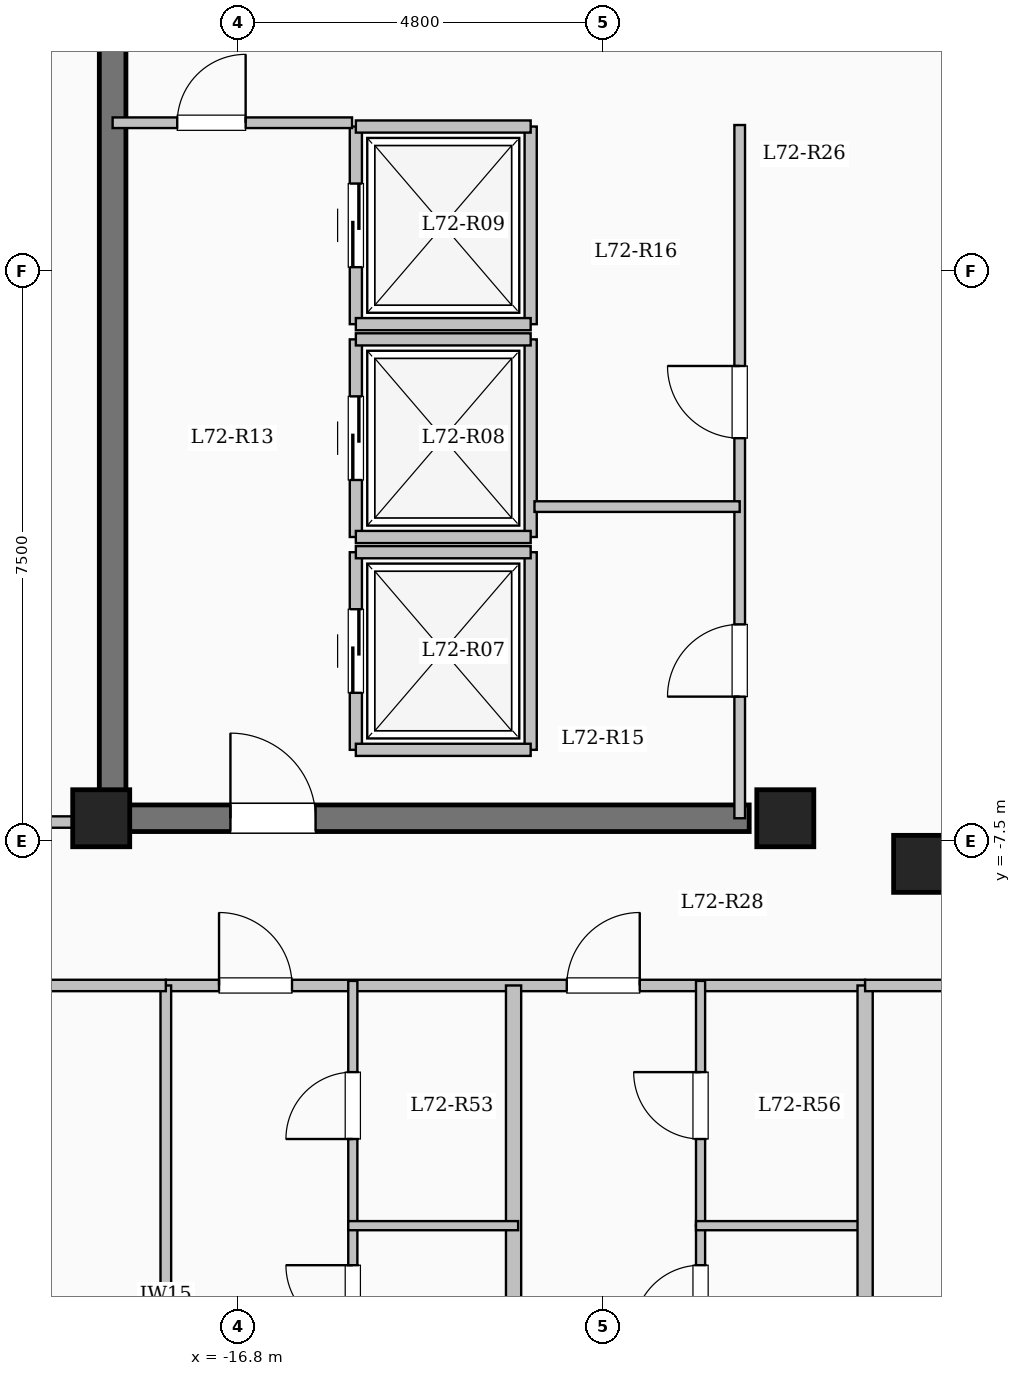
"""IFC4 building model, lengths in metres.
Left out: names, types, materials, properties, quantities, classifications, styles, units other than length and angle.
Written with IfcOpenShell. Run it as: python <this file> out.ifc"""

import sys

from ifc_helpers import new_model, si_unit, direction, frame, frame_2d, origin, origin_2d, place, context, subcontext, project, spatial, rectangle, extrude, element, fill, save


model = new_model("IFC4")
c1 = context("Model", 3, precision=1e-05, world=origin(), true_north=direction((0.0, 1.0)))
c2 = subcontext(c1, "Body", "Model", "MODEL_VIEW")
j1 = project(units=[si_unit("LENGTHUNIT", "METRE"), si_unit("PLANEANGLEUNIT", "RADIAN")], contexts=[c1])
p1 = place(None, origin())
s1 = spatial("IfcSite", under=j1, at=p1, CompositionType="ELEMENT")
p2 = place(p1, origin())
s2 = spatial("IfcBuilding", under=s1, at=p2, CompositionType="ELEMENT")
p3 = place(p2, frame((0.0, 0.0, 264.95)))
s3 = spatial("IfcBuildingStorey", under=s2, at=p3, CompositionType="ELEMENT", Elevation=264.95)
for number, where, z_axis, x_axis in (
    (1, (-7.8, -7.8, 0.0), (0.0, 0.0, 1.0), (1.0, 0.0, 0.0)),
    (2, (-9.6, -7.2, 0.0), (0.0, 0.0, 1.0), (1.0, 0.0, 0.0)),
    (3, (-18.6, -7.2, 0.0), (0.0, 0.0, 1.0), (1.0, 0.0, 0.0)),
):
    element("IfcColumn", number, at=place(p3, frame(where, z_axis=z_axis, x_axis=x_axis)), inside=s3, PredefinedType="COLUMN", context=c2, shape_type="SweptSolid", body=[
        extrude(rectangle(XDim=0.75, YDim=0.75, at=origin_2d()), origin(), (0.0, 0.0, 1.0), 3.35),
    ])
p4 = place(p3, frame((-15.25, -6.3, 0.0), z_axis=(0.0, 0.0, 1.0), x_axis=(0.0, 1.0, 0.0)))
e4 = element("IfcWall", 4, at=p4, inside=s3, PredefinedType="SOLIDWALL", context=c2, shape_type="SweptSolid", body=[
    extrude(rectangle(XDim=2.6, YDim=0.16, at=frame_2d((1.3, 0.0))), origin(), (0.0, 0.0, 1.0), 3.1),
])
p5 = place(p4, frame((0.75, 0.0, 0.0)))
e5 = element("IfcOpeningElement", 5, at=p5, cuts=e4, PredefinedType="OPENING", context=c2, shape_type="SweptSolid", body=[
    extrude(rectangle(XDim=1.1, YDim=2.15, at=frame_2d((0.55, 1.075))), frame((0.0, 0.09, 0.0), z_axis=(0.0, -1.0, 0.0), x_axis=(1.0, 0.0, 0.0)), (0.0, 0.0, 1.0), 0.18),
])
p6 = place(p3, frame((-12.95, -6.3, 0.0), z_axis=(0.0, 0.0, 1.0), x_axis=(0.0, 1.0, 0.0)))
e6 = element("IfcWall", 6, at=p6, inside=s3, PredefinedType="SOLIDWALL", context=c2, shape_type="SweptSolid", body=[
    extrude(rectangle(XDim=2.6, YDim=0.16, at=frame_2d((1.3, 0.0))), origin(), (0.0, 0.0, 1.0), 3.1),
])
for number, where, z_axis, x_axis in (
    (7, (-15.25, -6.3, 0.0), (0.0, 0.0, 1.0), (1.0, 0.0, 0.0)),
    (8, (-15.25, -3.7, 0.0), (0.0, 0.0, 1.0), (1.0, 0.0, 0.0)),
):
    element("IfcWall", number, at=place(p3, frame(where, z_axis=z_axis, x_axis=x_axis)), inside=s3, PredefinedType="SOLIDWALL", context=c2, shape_type="SweptSolid", body=[
        extrude(rectangle(XDim=2.3, YDim=0.16, at=frame_2d((1.15, 0.0))), origin(), (0.0, 0.0, 1.0), 3.1),
    ])
p7 = place(p3, frame((-15.25, -3.5, 0.0), z_axis=(0.0, 0.0, 1.0), x_axis=(0.0, 1.0, 0.0)))
e9 = element("IfcWall", 9, at=p7, inside=s3, PredefinedType="SOLIDWALL", context=c2, shape_type="SweptSolid", body=[
    extrude(rectangle(XDim=2.6, YDim=0.16, at=frame_2d((1.3, 0.0))), origin(), (0.0, 0.0, 1.0), 3.1),
])
p8 = place(p7, frame((0.75, 0.0, 0.0)))
e10 = element("IfcOpeningElement", 10, at=p8, cuts=e9, PredefinedType="OPENING", context=c2, shape_type="SweptSolid", body=[
    extrude(rectangle(XDim=1.1, YDim=2.15, at=frame_2d((0.55, 1.075))), frame((0.0, 0.09, 0.0), z_axis=(0.0, -1.0, 0.0), x_axis=(1.0, 0.0, 0.0)), (0.0, 0.0, 1.0), 0.18),
])
p9 = place(p3, frame((-12.95, -3.5, 0.0), z_axis=(0.0, 0.0, 1.0), x_axis=(0.0, 1.0, 0.0)))
e11 = element("IfcWall", 11, at=p9, inside=s3, PredefinedType="SOLIDWALL", context=c2, shape_type="SweptSolid", body=[
    extrude(rectangle(XDim=2.6, YDim=0.16, at=frame_2d((1.3, 0.0))), origin(), (0.0, 0.0, 1.0), 3.1),
])
for number, where, z_axis, x_axis in (
    (12, (-15.25, -3.5, 0.0), (0.0, 0.0, 1.0), (1.0, 0.0, 0.0)),
    (13, (-15.25, -0.9, 0.0), (0.0, 0.0, 1.0), (1.0, 0.0, 0.0)),
):
    element("IfcWall", number, at=place(p3, frame(where, z_axis=z_axis, x_axis=x_axis)), inside=s3, PredefinedType="SOLIDWALL", context=c2, shape_type="SweptSolid", body=[
        extrude(rectangle(XDim=2.3, YDim=0.16, at=frame_2d((1.15, 0.0))), origin(), (0.0, 0.0, 1.0), 3.1),
    ])
p10 = place(p3, frame((-15.25, -0.7, 0.0), z_axis=(0.0, 0.0, 1.0), x_axis=(0.0, 1.0, 0.0)))
e14 = element("IfcWall", 14, at=p10, inside=s3, PredefinedType="SOLIDWALL", context=c2, shape_type="SweptSolid", body=[
    extrude(rectangle(XDim=2.6, YDim=0.16, at=frame_2d((1.3, 0.0))), origin(), (0.0, 0.0, 1.0), 3.1),
])
p11 = place(p10, frame((0.75, 0.0, 0.0)))
e15 = element("IfcOpeningElement", 15, at=p11, cuts=e14, PredefinedType="OPENING", context=c2, shape_type="SweptSolid", body=[
    extrude(rectangle(XDim=1.1, YDim=2.15, at=frame_2d((0.55, 1.075))), frame((0.0, 0.09, 0.0), z_axis=(0.0, -1.0, 0.0), x_axis=(1.0, 0.0, 0.0)), (0.0, 0.0, 1.0), 0.18),
])
p12 = place(p3, frame((-12.95, -0.7, 0.0), z_axis=(0.0, 0.0, 1.0), x_axis=(0.0, 1.0, 0.0)))
e16 = element("IfcWall", 16, at=p12, inside=s3, PredefinedType="SOLIDWALL", context=c2, shape_type="SweptSolid", body=[
    extrude(rectangle(XDim=2.6, YDim=0.16, at=frame_2d((1.3, 0.0))), origin(), (0.0, 0.0, 1.0), 3.1),
])
for number, where, z_axis, x_axis in (
    (17, (-15.25, -0.7, 0.0), (0.0, 0.0, 1.0), (1.0, 0.0, 0.0)),
    (18, (-15.25, 1.9, 0.0), (0.0, 0.0, 1.0), (1.0, 0.0, 0.0)),
):
    element("IfcWall", number, at=place(p3, frame(where, z_axis=z_axis, x_axis=x_axis)), inside=s3, PredefinedType="SOLIDWALL", context=c2, shape_type="SweptSolid", body=[
        extrude(rectangle(XDim=2.3, YDim=0.16, at=frame_2d((1.15, 0.0))), origin(), (0.0, 0.0, 1.0), 3.1),
    ])
p13 = place(p3, frame((-18.45, -7.375, 0.0), z_axis=(0.0, 0.0, 1.0), x_axis=(0.0, 1.0, 0.0)))
e19 = element("IfcWall", 19, at=p13, inside=s3, PredefinedType="SHEAR", context=c2, shape_type="SweptSolid", body=[
    extrude(rectangle(XDim=14.05, YDim=0.35, at=frame_2d((7.025, 0.0))), origin(), (0.0, 0.0, 1.0), 3.35),
])
p14 = place(p3, frame((-18.625, -7.2, 0.0), z_axis=(0.0, 0.0, 1.0), x_axis=(1.0, 0.0, 0.0)))
e20 = element("IfcWall", 20, at=p14, inside=s3, PredefinedType="SHEAR", context=c2, shape_type="SweptSolid", body=[
    extrude(rectangle(XDim=8.55, YDim=0.35, at=frame_2d((4.275, 0.0))), origin(), (0.0, 0.0, 1.0), 3.35),
])
p15 = place(p14, frame((1.725, 0.0, 0.0)))
e21 = element("IfcOpeningElement", 21, at=p15, cuts=e20, PredefinedType="OPENING", context=c2, shape_type="SweptSolid", body=[
    extrude(rectangle(XDim=1.12, YDim=2.15, at=frame_2d((0.56, 1.075))), frame((0.0, 0.185, 0.0), z_axis=(0.0, -1.0, 0.0), x_axis=(1.0, 0.0, 0.0)), (0.0, 0.0, 1.0), 0.37),
])
p16 = place(p3, frame((-18.45, 1.95, 0.0), z_axis=(0.0, 0.0, 1.0), x_axis=(1.0, 0.0, 0.0)))
e22 = element("IfcWall", 22, at=p16, inside=s3, PredefinedType="PARTITIONING", context=c2, shape_type="SweptSolid", body=[
    extrude(rectangle(XDim=3.15, YDim=0.14, at=frame_2d((1.575, 0.0))), origin(), (0.0, 0.0, 1.0), 3.1),
])
p17 = place(p16, frame((0.85, 0.0, 0.0)))
e23 = element("IfcOpeningElement", 23, at=p17, cuts=e22, PredefinedType="OPENING", context=c2, shape_type="SweptSolid", body=[
    extrude(rectangle(XDim=0.9, YDim=2.08, at=frame_2d((0.45, 1.04))), frame((0.0, 0.08, 0.0), z_axis=(0.0, -1.0, 0.0), x_axis=(1.0, 0.0, 0.0)), (0.0, 0.0, 1.0), 0.16),
])
p18 = place(p3, frame((-10.2, -7.2, 0.0), z_axis=(0.0, 0.0, 1.0), x_axis=(0.0, 1.0, 0.0)))
e24 = element("IfcWall", 24, at=p18, inside=s3, PredefinedType="PARTITIONING", context=c2, shape_type="SweptSolid", body=[
    extrude(rectangle(XDim=9.12, YDim=0.14, at=frame_2d((4.56, 0.0))), origin(), (0.0, 0.0, 1.0), 3.1),
])
p19 = place(p18, frame((1.6, 0.0, 0.0)))
e25 = element("IfcOpeningElement", 25, at=p19, cuts=e24, PredefinedType="OPENING", context=c2, shape_type="SweptSolid", body=[
    extrude(rectangle(XDim=0.95, YDim=2.12, at=frame_2d((0.475, 1.06))), frame((0.0, 0.08, 0.0), z_axis=(0.0, -1.0, 0.0), x_axis=(1.0, 0.0, 0.0)), (0.0, 0.0, 1.0), 0.16),
])
p20 = place(p18, frame((5.0, 0.0, 0.0)))
e26 = element("IfcOpeningElement", 26, at=p20, cuts=e24, PredefinedType="OPENING", context=c2, shape_type="SweptSolid", body=[
    extrude(rectangle(XDim=0.95, YDim=2.12, at=frame_2d((0.475, 1.06))), frame((0.0, 0.08, 0.0), z_axis=(0.0, -1.0, 0.0), x_axis=(1.0, 0.0, 0.0)), (0.0, 0.0, 1.0), 0.16),
])
p21 = place(p3, frame((-12.9, -3.1, 0.0), z_axis=(0.0, 0.0, 1.0), x_axis=(1.0, 0.0, 0.0)))
e27 = element("IfcWall", 27, at=p21, inside=s3, PredefinedType="PARTITIONING", context=c2, shape_type="SweptSolid", body=[
    extrude(rectangle(XDim=2.7, YDim=0.14, at=frame_2d((1.35, 0.0))), origin(), (0.0, 0.0, 1.0), 3.1),
])
p22 = place(p3, frame((-17.75, -9.4, 0.0), z_axis=(0.0, 0.0, 1.0), x_axis=(1.0, 0.0, 0.0)))
e28 = element("IfcWall", 28, at=p22, inside=s3, PredefinedType="PARTITIONING", context=c2, shape_type="SweptSolid", body=[
    extrude(rectangle(XDim=9.2, YDim=0.15, at=frame_2d((4.6, 0.0))), origin(), (0.0, 0.0, 1.0), 3.1),
])
p23 = place(p22, frame((0.7, 0.0, 0.0)))
e29 = element("IfcOpeningElement", 29, at=p23, cuts=e28, PredefinedType="OPENING", context=c2, shape_type="SweptSolid", body=[
    extrude(rectangle(XDim=0.96, YDim=2.15, at=frame_2d((0.48, 1.075))), frame((0.0, 0.085, 0.0), z_axis=(0.0, -1.0, 0.0), x_axis=(1.0, 0.0, 0.0)), (0.0, 0.0, 1.0), 0.17),
])
p24 = place(p22, frame((5.275, 0.0, 0.0)))
e30 = element("IfcOpeningElement", 30, at=p24, cuts=e28, PredefinedType="OPENING", context=c2, shape_type="SweptSolid", body=[
    extrude(rectangle(XDim=0.96, YDim=2.15, at=frame_2d((0.48, 1.075))), frame((0.0, 0.085, 0.0), z_axis=(0.0, -1.0, 0.0), x_axis=(1.0, 0.0, 0.0)), (0.0, 0.0, 1.0), 0.17),
])
p25 = place(p3, frame((-13.175, -20.9, 0.0), z_axis=(0.0, 0.0, 1.0), x_axis=(0.0, 1.0, 0.0)))
e31 = element("IfcWall", 31, at=p25, inside=s3, PredefinedType="SOLIDWALL", context=c2, shape_type="SweptSolid", body=[
    extrude(rectangle(XDim=11.5, YDim=0.2, at=frame_2d((5.75, 0.0))), origin(), (0.0, 0.0, 1.0), 3.1),
])
p26 = place(p3, frame((-15.29, -20.9, 0.0), z_axis=(0.0, 0.0, 1.0), x_axis=(0.0, 1.0, 0.0)))
e32 = element("IfcWall", 32, at=p26, inside=s3, PredefinedType="PARTITIONING", context=c2, shape_type="SweptSolid", body=[
    extrude(rectangle(XDim=8.34, YDim=0.12, at=frame_2d((4.17, 0.0))), origin(), (0.0, 0.0, 1.0), 2.685),
])
p27 = place(p26, frame((6.94, 0.0, 0.0)))
e33 = element("IfcOpeningElement", 33, at=p27, cuts=e32, PredefinedType="OPENING", context=c2, shape_type="SweptSolid", body=[
    extrude(rectangle(XDim=0.88, YDim=2.1, at=frame_2d((0.44, 1.05))), frame((0.0, 0.07, 0.0), z_axis=(0.0, -1.0, 0.0), x_axis=(1.0, 0.0, 0.0)), (0.0, 0.0, 1.0), 0.14),
])
p28 = place(p3, frame((-15.29, -12.56, 0.0), z_axis=(0.0, 0.0, 1.0), x_axis=(0.0, 1.0, 0.0)))
e34 = element("IfcWall", 34, at=p28, inside=s3, PredefinedType="PARTITIONING", context=c2, shape_type="SweptSolid", body=[
    extrude(rectangle(XDim=3.22, YDim=0.12, at=frame_2d((1.61, 0.0))), origin(), (0.0, 0.0, 1.0), 2.685),
])
p29 = place(p28, frame((1.14, 0.0, 0.0)))
e35 = element("IfcOpeningElement", 35, at=p29, cuts=e34, PredefinedType="OPENING", context=c2, shape_type="SweptSolid", body=[
    extrude(rectangle(XDim=0.88, YDim=2.1, at=frame_2d((0.44, 1.05))), frame((0.0, 0.07, 0.0), z_axis=(0.0, -1.0, 0.0), x_axis=(1.0, 0.0, 0.0)), (0.0, 0.0, 1.0), 0.14),
])
p30 = place(p3, frame((-15.35, -12.56, 0.0), z_axis=(0.0, 0.0, 1.0), x_axis=(1.0, 0.0, 0.0)))
e36 = element("IfcWall", 36, at=p30, inside=s3, PredefinedType="PARTITIONING", context=c2, shape_type="SweptSolid", body=[
    extrude(rectangle(XDim=2.235, YDim=0.12, at=frame_2d((1.118, 0.0))), origin(), (0.0, 0.0, 1.0), 2.785),
])
p31 = place(p3, frame((-10.715, -20.97, 0.0), z_axis=(0.0, 0.0, 1.0), x_axis=(0.0, 1.0, 0.0)))
e37 = element("IfcWall", 37, at=p31, inside=s3, PredefinedType="PARTITIONING", context=c2, shape_type="SweptSolid", body=[
    extrude(rectangle(XDim=8.41, YDim=0.12, at=frame_2d((4.205, 0.0))), origin(), (0.0, 0.0, 1.0), 3.1),
])
p32 = place(p31, frame((7.01, 0.0, 0.0)))
e38 = element("IfcOpeningElement", 38, at=p32, cuts=e37, PredefinedType="OPENING", context=c2, shape_type="SweptSolid", body=[
    extrude(rectangle(XDim=0.88, YDim=2.1, at=frame_2d((0.44, 1.05))), frame((0.0, 0.07, 0.0), z_axis=(0.0, -1.0, 0.0), x_axis=(1.0, 0.0, 0.0)), (0.0, 0.0, 1.0), 0.14),
])
p33 = place(p3, frame((-10.715, -12.56, 0.0), z_axis=(0.0, 0.0, 1.0), x_axis=(0.0, 1.0, 0.0)))
e39 = element("IfcWall", 39, at=p33, inside=s3, PredefinedType="PARTITIONING", context=c2, shape_type="SweptSolid", body=[
    extrude(rectangle(XDim=3.22, YDim=0.12, at=frame_2d((1.61, 0.0))), origin(), (0.0, 0.0, 1.0), 3.1),
])
p34 = place(p33, frame((1.14, 0.0, 0.0)))
e40 = element("IfcOpeningElement", 40, at=p34, cuts=e39, PredefinedType="OPENING", context=c2, shape_type="SweptSolid", body=[
    extrude(rectangle(XDim=0.88, YDim=2.1, at=frame_2d((0.44, 1.05))), frame((0.0, 0.07, 0.0), z_axis=(0.0, -1.0, 0.0), x_axis=(1.0, 0.0, 0.0)), (0.0, 0.0, 1.0), 0.14),
])
p35 = place(p3, frame((-10.775, -12.56, 0.0), z_axis=(0.0, 0.0, 1.0), x_axis=(1.0, 0.0, 0.0)))
e41 = element("IfcWall", 41, at=p35, inside=s3, PredefinedType="PARTITIONING", context=c2, shape_type="SweptSolid", body=[
    extrude(rectangle(XDim=2.235, YDim=0.12, at=frame_2d((1.117, 0.0))), origin(), (0.0, 0.0, 1.0), 2.785),
])
p36 = place(p3, frame((-8.55, -21.504, 0.0), z_axis=(0.0, 0.0, 1.0), x_axis=(0.0, 1.0, 0.0)))
e42 = element("IfcWall", 42, at=p36, inside=s3, PredefinedType="SOLIDWALL", context=c2, shape_type="SweptSolid", body=[
    extrude(rectangle(XDim=12.104, YDim=0.2, at=frame_2d((6.052, 0.0))), origin(), (0.0, 0.0, 1.0), 3.1),
])
p37 = place(p3, frame((-8.55, -9.4, 0.0), z_axis=(0.0, 0.0, 1.0), x_axis=(1.0, 0.0, 0.0)))
e43 = element("IfcWall", 43, at=p37, inside=s3, PredefinedType="PARTITIONING", context=c2, shape_type="SweptSolid", body=[
    extrude(rectangle(XDim=17.1, YDim=0.15, at=frame_2d((8.55, 0.0))), origin(), (0.0, 0.0, 1.0), 3.1),
])
p38 = place(p37, frame((1.75, 0.0, 0.0)))
e44 = element("IfcOpeningElement", 44, at=p38, cuts=e43, PredefinedType="OPENING", context=c2, shape_type="SweptSolid", body=[
    extrude(rectangle(XDim=0.96, YDim=2.15, at=frame_2d((0.48, 1.075))), frame((0.0, 0.085, 0.0), z_axis=(0.0, -1.0, 0.0), x_axis=(1.0, 0.0, 0.0)), (0.0, 0.0, 1.0), 0.17),
])
p39 = place(p3, frame((-22.68, -7.25, 0.0), z_axis=(0.0, 0.0, 1.0), x_axis=(1.0, 0.0, 0.0)))
e45 = element("IfcWall", 45, at=p39, inside=s3, PredefinedType="PARTITIONING", context=c2, shape_type="SweptSolid", body=[
    extrude(rectangle(XDim=4.23, YDim=0.15, at=frame_2d((2.115, 0.0))), origin(), (0.0, 0.0, 1.0), 3.1),
])
p40 = place(p39, frame((1.63, 0.0, 0.0)))
e46 = element("IfcOpeningElement", 46, at=p40, cuts=e45, PredefinedType="OPENING", context=c2, shape_type="SweptSolid", body=[
    extrude(rectangle(XDim=1.08, YDim=2.15, at=frame_2d((0.54, 1.075))), frame((0.0, 0.085, 0.0), z_axis=(0.0, -1.0, 0.0), x_axis=(1.0, 0.0, 0.0)), (0.0, 0.0, 1.0), 0.17),
])
p41 = place(p3, frame((-17.75, -17.55, 0.0), z_axis=(0.0, 0.0, 1.0), x_axis=(0.0, 1.0, 0.0)))
e47 = element("IfcWall", 47, at=p41, inside=s3, PredefinedType="PARTITIONING", context=c2, shape_type="SweptSolid", body=[
    extrude(rectangle(XDim=8.15, YDim=0.14, at=frame_2d((4.075, 0.0))), origin(), (0.0, 0.0, 1.0), 3.1),
])
p42 = place(p3, frame((-22.68, -9.4, 0.0), z_axis=(0.0, 0.0, 1.0), x_axis=(1.0, 0.0, 0.0)))
e48 = element("IfcWall", 48, at=p42, inside=s3, PredefinedType="PARTITIONING", context=c2, shape_type="SweptSolid", body=[
    extrude(rectangle(XDim=4.93, YDim=0.15, at=frame_2d((2.465, 0.0))), origin(), (0.0, 0.0, 1.0), 3.1),
])
p43 = place(p42, frame((1.99, 0.0, 0.0)))
e49 = element("IfcOpeningElement", 49, at=p43, cuts=e48, PredefinedType="OPENING", context=c2, shape_type="SweptSolid", body=[
    extrude(rectangle(XDim=0.95, YDim=2.15, at=frame_2d((0.475, 1.075))), frame((0.0, 0.085, 0.0), z_axis=(0.0, -1.0, 0.0), x_axis=(1.0, 0.0, 0.0)), (0.0, 0.0, 1.0), 0.17),
])
p44 = place(p5, origin())
e50 = element("IfcDoor", 50, at=p44, inside=s3, OperationType="SLIDING_TO_LEFT", PredefinedType="DOOR", context=c2, shape_type="SweptSolid", body=[
    extrude(rectangle(XDim=1.1, YDim=2.15, at=frame_2d((0.55, 1.075))), frame((0.0, 0.025, 0.0), z_axis=(0.0, -1.0, 0.0), x_axis=(1.0, 0.0, 0.0)), (0.0, 0.0, 1.0), 0.05),
])
fill(e5, e50)
p45 = place(p8, origin())
e51 = element("IfcDoor", 51, at=p45, inside=s3, OperationType="SLIDING_TO_LEFT", PredefinedType="DOOR", context=c2, shape_type="SweptSolid", body=[
    extrude(rectangle(XDim=1.1, YDim=2.15, at=frame_2d((0.55, 1.075))), frame((0.0, 0.025, 0.0), z_axis=(0.0, -1.0, 0.0), x_axis=(1.0, 0.0, 0.0)), (0.0, 0.0, 1.0), 0.05),
])
fill(e10, e51)
p46 = place(p11, origin())
e52 = element("IfcDoor", 52, at=p46, inside=s3, OperationType="SLIDING_TO_LEFT", PredefinedType="DOOR", context=c2, shape_type="SweptSolid", body=[
    extrude(rectangle(XDim=1.1, YDim=2.15, at=frame_2d((0.55, 1.075))), frame((0.0, 0.025, 0.0), z_axis=(0.0, -1.0, 0.0), x_axis=(1.0, 0.0, 0.0)), (0.0, 0.0, 1.0), 0.05),
])
fill(e15, e52)
p47 = place(p15, origin())
e53 = element("IfcDoor", 53, at=p47, inside=s3, OperationType="SINGLE_SWING_LEFT", PredefinedType="DOOR", context=c2, shape_type="SweptSolid", body=[
    extrude(rectangle(XDim=1.12, YDim=2.15, at=frame_2d((0.56, 1.075))), frame((0.0, 0.025, 0.0), z_axis=(0.0, -1.0, 0.0), x_axis=(1.0, 0.0, 0.0)), (0.0, 0.0, 1.0), 0.05),
])
fill(e21, e53)
p48 = place(p17, origin())
e54 = element("IfcDoor", 54, at=p48, inside=s3, OperationType="SINGLE_SWING_RIGHT", PredefinedType="DOOR", context=c2, shape_type="SweptSolid", body=[
    extrude(rectangle(XDim=0.9, YDim=2.08, at=frame_2d((0.45, 1.04))), frame((0.0, 0.025, 0.0), z_axis=(0.0, -1.0, 0.0), x_axis=(1.0, 0.0, 0.0)), (0.0, 0.0, 1.0), 0.05),
])
fill(e23, e54)
p49 = place(p19, origin())
e55 = element("IfcDoor", 55, at=p49, inside=s3, OperationType="SINGLE_SWING_LEFT", PredefinedType="DOOR", context=c2, shape_type="SweptSolid", body=[
    extrude(rectangle(XDim=0.95, YDim=2.12, at=frame_2d((0.475, 1.06))), frame((0.0, 0.025, 0.0), z_axis=(0.0, -1.0, 0.0), x_axis=(1.0, 0.0, 0.0)), (0.0, 0.0, 1.0), 0.05),
])
fill(e25, e55)
p50 = place(p20, origin())
e56 = element("IfcDoor", 56, at=p50, inside=s3, OperationType="SINGLE_SWING_RIGHT", PredefinedType="DOOR", context=c2, shape_type="SweptSolid", body=[
    extrude(rectangle(XDim=0.95, YDim=2.12, at=frame_2d((0.475, 1.06))), frame((0.0, 0.025, 0.0), z_axis=(0.0, -1.0, 0.0), x_axis=(1.0, 0.0, 0.0)), (0.0, 0.0, 1.0), 0.05),
])
fill(e26, e56)
p51 = place(p23, origin())
e57 = element("IfcDoor", 57, at=p51, inside=s3, OperationType="SINGLE_SWING_LEFT", PredefinedType="DOOR", context=c2, shape_type="SweptSolid", body=[
    extrude(rectangle(XDim=0.96, YDim=2.15, at=frame_2d((0.48, 1.075))), frame((0.0, 0.025, 0.0), z_axis=(0.0, -1.0, 0.0), x_axis=(1.0, 0.0, 0.0)), (0.0, 0.0, 1.0), 0.05),
])
fill(e29, e57)
p52 = place(p27, origin())
e58 = element("IfcDoor", 58, at=p52, inside=s3, OperationType="SINGLE_SWING_RIGHT", PredefinedType="DOOR", context=c2, shape_type="SweptSolid", body=[
    extrude(rectangle(XDim=0.88, YDim=2.1, at=frame_2d((0.44, 1.05))), frame((0.0, 0.025, 0.0), z_axis=(0.0, -1.0, 0.0), x_axis=(1.0, 0.0, 0.0)), (0.0, 0.0, 1.0), 0.05),
])
fill(e33, e58)
p53 = place(p29, origin())
e59 = element("IfcDoor", 59, at=p53, inside=s3, OperationType="SINGLE_SWING_LEFT", PredefinedType="DOOR", context=c2, shape_type="SweptSolid", body=[
    extrude(rectangle(XDim=0.88, YDim=2.1, at=frame_2d((0.44, 1.05))), frame((0.0, 0.025, 0.0), z_axis=(0.0, -1.0, 0.0), x_axis=(1.0, 0.0, 0.0)), (0.0, 0.0, 1.0), 0.05),
])
fill(e35, e59)
p54 = place(p24, origin())
e60 = element("IfcDoor", 60, at=p54, inside=s3, OperationType="SINGLE_SWING_RIGHT", PredefinedType="DOOR", context=c2, shape_type="SweptSolid", body=[
    extrude(rectangle(XDim=0.96, YDim=2.15, at=frame_2d((0.48, 1.075))), frame((0.0, 0.025, 0.0), z_axis=(0.0, -1.0, 0.0), x_axis=(1.0, 0.0, 0.0)), (0.0, 0.0, 1.0), 0.05),
])
fill(e30, e60)
p55 = place(p32, origin())
e61 = element("IfcDoor", 61, at=p55, inside=s3, OperationType="SINGLE_SWING_LEFT", PredefinedType="DOOR", context=c2, shape_type="SweptSolid", body=[
    extrude(rectangle(XDim=0.88, YDim=2.1, at=frame_2d((0.44, 1.05))), frame((0.0, 0.025, 0.0), z_axis=(0.0, -1.0, 0.0), x_axis=(1.0, 0.0, 0.0)), (0.0, 0.0, 1.0), 0.05),
])
fill(e38, e61)
p56 = place(p34, origin())
e62 = element("IfcDoor", 62, at=p56, inside=s3, OperationType="SINGLE_SWING_RIGHT", PredefinedType="DOOR", context=c2, shape_type="SweptSolid", body=[
    extrude(rectangle(XDim=0.88, YDim=2.1, at=frame_2d((0.44, 1.05))), frame((0.0, 0.025, 0.0), z_axis=(0.0, -1.0, 0.0), x_axis=(1.0, 0.0, 0.0)), (0.0, 0.0, 1.0), 0.05),
])
fill(e40, e62)
save(model, sys.argv[1])
